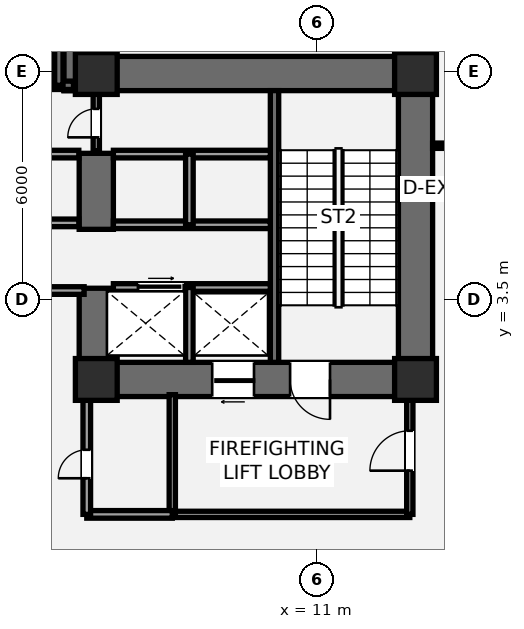
"""IFC4 building model, lengths in metres.
Left out: names, types, materials, properties, quantities, classifications, styles, units other than length and angle.
Written with IfcOpenShell. Run it as: python <this file> out.ifc"""

import sys

from ifc_helpers import new_model, si_unit, direction, frame, frame_2d, origin, origin_2d, place, context, subcontext, project, spatial, rectangle, extrude, element, fill, save


model = new_model("IFC4")
c1 = context("Model", 3, precision=1e-05, world=origin(), true_north=direction((0.0, 1.0)))
c2 = subcontext(c1, "Body", "Model", "MODEL_VIEW")
j1 = project(units=[si_unit("LENGTHUNIT", "METRE"), si_unit("PLANEANGLEUNIT", "RADIAN")], contexts=[c1])
p1 = place(None, origin())
s1 = spatial("IfcSite", under=j1, at=p1, CompositionType="ELEMENT")
p2 = place(p1, origin())
s2 = spatial("IfcBuilding", under=s1, at=p2, CompositionType="ELEMENT")
p3 = place(p2, frame((0.0, 0.0, -8.8)))
s3 = spatial("IfcBuildingStorey", under=s2, at=p3, CompositionType="ELEMENT", Elevation=-8.8)
p4 = place(p3, frame((13.6, 0.95, 0.0), z_axis=(0.0, 0.0, 1.0), x_axis=(0.0, 1.0, 0.0)))
e1 = element("IfcWall", 1, at=p4, inside=s3, PredefinedType="SHEAR", context=c2, shape_type="SweptSolid", body=[
    extrude(rectangle(XDim=8.95, YDim=0.9, at=frame_2d((4.475, 0.0))), origin(), (0.0, 0.0, 1.0), 4.4),
])
p5 = place(p3, frame((4.35, 9.45, 0.0), z_axis=(0.0, 0.0, 1.0), x_axis=(1.0, 0.0, 0.0)))
e2 = element("IfcWall", 2, at=p5, inside=s3, PredefinedType="SHEAR", context=c2, shape_type="SweptSolid", body=[
    extrude(rectangle(XDim=9.7, YDim=0.9, at=frame_2d((4.85, 0.0))), origin(), (0.0, 0.0, 1.0), 4.4),
])
p6 = place(p3, frame((14.05, 1.4, 0.0), z_axis=(0.0, 0.0, 1.0), x_axis=(-1.0, 0.0, 0.0)))
e3 = element("IfcWall", 3, at=p6, inside=s3, PredefinedType="SHEAR", context=c2, shape_type="SweptSolid", body=[
    extrude(rectangle(XDim=9.3, YDim=0.9, at=frame_2d((4.65, 0.0))), origin(), (0.0, 0.0, 1.0), 4.4),
])
p7 = place(p6, frame((2.7, 0.0, 0.0)))
e4 = element("IfcOpeningElement", 4, at=p7, cuts=e3, PredefinedType="OPENING", context=c2, shape_type="SweptSolid", body=[
    extrude(rectangle(XDim=1.05, YDim=2.15, at=frame_2d((0.525, 1.075))), frame((0.0, 0.46, 0.0), z_axis=(0.0, -1.0, 0.0), x_axis=(1.0, 0.0, 0.0)), (0.0, 0.0, 1.0), 0.92),
])
p8 = place(p6, frame((4.7, 0.0, 0.0)))
e5 = element("IfcOpeningElement", 5, at=p8, cuts=e3, PredefinedType="OPENING", context=c2, shape_type="SweptSolid", body=[
    extrude(rectangle(XDim=1.1, YDim=2.2, at=frame_2d((0.55, 1.1))), frame((0.0, 0.46, 0.0), z_axis=(0.0, -1.0, 0.0), x_axis=(1.0, 0.0, 0.0)), (0.0, 0.0, 1.0), 0.92),
])
p9 = place(p3, frame((5.2, 0.95, 0.0), z_axis=(0.0, 0.0, 1.0), x_axis=(0.0, 1.0, 0.0)))
e6 = element("IfcWall", 6, at=p9, inside=s3, PredefinedType="SHEAR", context=c2, shape_type="SweptSolid", body=[
    extrude(rectangle(XDim=2.85, YDim=0.9, at=frame_2d((1.425, 0.0))), origin(), (0.0, 0.0, 1.0), 4.4),
])
p10 = place(p3, frame((5.2, 5.35, 0.0), z_axis=(0.0, 0.0, 1.0), x_axis=(0.0, 1.0, 0.0)))
e7 = element("IfcWall", 7, at=p10, inside=s3, PredefinedType="SHEAR", context=c2, shape_type="SweptSolid", body=[
    extrude(rectangle(XDim=2.0, YDim=0.9, at=frame_2d((1.0, 0.0))), origin(), (0.0, 0.0, 1.0), 4.4),
])
p11 = place(p3, frame((9.89, 1.85, 0.0), z_axis=(0.0, 0.0, 1.0), x_axis=(0.0, 1.0, 0.0)))
e8 = element("IfcWall", 8, at=p11, inside=s3, PredefinedType="SHEAR", context=c2, shape_type="SweptSolid", body=[
    extrude(rectangle(XDim=7.15, YDim=0.22, at=frame_2d((3.575, 0.0))), origin(), (0.0, 0.0, 1.0), 4.4),
])
p12 = place(p3, frame((4.8, 9.0, 0.0), z_axis=(0.0, 0.0, 1.0), x_axis=(0.0, 1.0, 0.0)))
e9 = element("IfcWall", 9, at=p12, inside=s3, PredefinedType="SHEAR", context=c2, shape_type="SweptSolid", body=[
    extrude(rectangle(XDim=4.3, YDim=0.9, at=frame_2d((2.15, 0.0))), origin(), (0.0, 0.0, 1.0), 4.4),
])
p13 = place(p3, frame((-4.7, 9.14, 0.0), z_axis=(0.0, 0.0, 1.0), x_axis=(1.0, 0.0, 0.0)))
e10 = element("IfcWall", 10, at=p13, inside=s3, PredefinedType="SHEAR", context=c2, shape_type="SweptSolid", body=[
    extrude(rectangle(XDim=9.3, YDim=0.22, at=frame_2d((4.65, 0.0))), origin(), (0.0, 0.0, 1.0), 4.4),
])
p14 = place(p13, frame((1.15, 0.0, 0.0)))
e11 = element("IfcOpeningElement", 11, at=p14, cuts=e10, PredefinedType="OPENING", context=c2, shape_type="SweptSolid", body=[
    extrude(rectangle(XDim=1.05, YDim=2.15, at=frame_2d((0.525, 1.075))), frame((0.0, 0.12, 0.0), z_axis=(0.0, -1.0, 0.0), x_axis=(1.0, 0.0, 0.0)), (0.0, 0.0, 1.0), 0.24),
])
p15 = place(p3, frame((4.215, 9.14, 0.0), z_axis=(0.0, 0.0, 1.0), x_axis=(0.0, 1.0, 0.0)))
e12 = element("IfcWall", 12, at=p15, inside=s3, PredefinedType="SHEAR", context=c2, shape_type="SweptSolid", body=[
    extrude(rectangle(XDim=3.26, YDim=0.22, at=frame_2d((1.63, 0.0))), origin(), (0.0, 0.0, 1.0), 4.4),
])
for number, where, z_axis, x_axis in (
    (13, (5.2, 1.4, 0.0), (0.0, 0.0, 1.0), (1.0, 0.0, 0.0)),
    (14, (5.2, 9.45, 0.0), (0.0, 0.0, 1.0), (1.0, 0.0, 0.0)),
    (15, (13.6, 1.4, 0.0), (0.0, 0.0, 1.0), (1.0, 0.0, 0.0)),
    (16, (13.6, 9.45, 0.0), (0.0, 0.0, 1.0), (1.0, 0.0, 0.0)),
):
    element("IfcColumn", number, at=place(p3, frame(where, z_axis=z_axis, x_axis=x_axis)), inside=s3, PredefinedType="COLUMN", context=c2, shape_type="SweptSolid", body=[
        extrude(rectangle(XDim=1.1, YDim=1.1, at=origin_2d()), origin(), (0.0, 0.0, 1.0), 4.4),
    ])
p16 = place(p3, frame((7.2, -2.15, 0.0), z_axis=(0.0, 0.0, 1.0), x_axis=(1.0, 0.0, 0.0)))
e17 = element("IfcWall", 17, at=p16, inside=s3, PredefinedType="PARTITIONING", context=c2, shape_type="SweptSolid", body=[
    extrude(rectangle(XDim=6.25, YDim=0.165, at=frame_2d((3.125, 0.0))), origin(), (0.0, 0.0, 1.0), 4.14),
])
p17 = place(p3, frame((7.2, -2.15, 0.0), z_axis=(0.0, 0.0, 1.0), x_axis=(0.0, 1.0, 0.0)))
e18 = element("IfcWall", 18, at=p17, inside=s3, PredefinedType="PARTITIONING", context=c2, shape_type="SweptSolid", body=[
    extrude(rectangle(XDim=3.15, YDim=0.165, at=frame_2d((1.575, 0.0))), origin(), (0.0, 0.0, 1.0), 4.14),
])
p18 = place(p3, frame((13.45, -2.15, 0.0), z_axis=(0.0, 0.0, 1.0), x_axis=(0.0, 1.0, 0.0)))
e19 = element("IfcWall", 19, at=p18, inside=s3, PredefinedType="PARTITIONING", context=c2, shape_type="SweptSolid", body=[
    extrude(rectangle(XDim=3.15, YDim=0.165, at=frame_2d((1.575, 0.0))), origin(), (0.0, 0.0, 1.0), 4.14),
])
p19 = place(p18, frame((1.15, 0.0, 0.0)))
e20 = element("IfcOpeningElement", 20, at=p19, cuts=e19, PredefinedType="OPENING", context=c2, shape_type="SweptSolid", body=[
    extrude(rectangle(XDim=1.05, YDim=2.15, at=frame_2d((0.525, 1.075))), frame((0.0, 0.093, 0.0), z_axis=(0.0, -1.0, 0.0), x_axis=(1.0, 0.0, 0.0)), (0.0, 0.0, 1.0), 0.185),
])
p20 = place(p3, frame((4.95, -2.15, 0.0), z_axis=(0.0, 0.0, 1.0), x_axis=(1.0, 0.0, 0.0)))
e21 = element("IfcWall", 21, at=p20, inside=s3, PredefinedType="SOLIDWALL", context=c2, shape_type="SweptSolid", body=[
    extrude(rectangle(XDim=2.25, YDim=0.2, at=frame_2d((1.125, 0.0))), origin(), (0.0, 0.0, 1.0), 4.14),
])
p21 = place(p3, frame((4.95, -2.15, 0.0), z_axis=(0.0, 0.0, 1.0), x_axis=(0.0, 1.0, 0.0)))
e22 = element("IfcWall", 22, at=p21, inside=s3, PredefinedType="SOLIDWALL", context=c2, shape_type="SweptSolid", body=[
    extrude(rectangle(XDim=3.15, YDim=0.2, at=frame_2d((1.575, 0.0))), origin(), (0.0, 0.0, 1.0), 3.508),
])
p22 = place(p21, frame((0.95, 0.0, 0.0)))
e23 = element("IfcOpeningElement", 23, at=p22, cuts=e22, PredefinedType="OPENING", context=c2, shape_type="SweptSolid", body=[
    extrude(rectangle(XDim=0.75, YDim=2.1, at=frame_2d((0.375, 1.05))), frame((0.0, 0.11, 0.0), z_axis=(0.0, -1.0, 0.0), x_axis=(1.0, 0.0, 0.0)), (0.0, 0.0, 1.0), 0.22),
])
p23 = place(p3, frame((5.65, 3.82, 0.0), z_axis=(0.0, 0.0, 1.0), x_axis=(1.0, 0.0, 0.0)))
e24 = element("IfcWall", 24, at=p23, inside=s3, PredefinedType="SOLIDWALL", context=c2, shape_type="SweptSolid", body=[
    extrude(rectangle(XDim=4.13, YDim=0.2, at=frame_2d((2.065, 0.0))), origin(), (0.0, 0.0, 1.0), 4.14),
])
p24 = place(p23, frame((0.65, 0.0, 0.0)))
e25 = element("IfcOpeningElement", 25, at=p24, cuts=e24, PredefinedType="OPENING", context=c2, shape_type="SweptSolid", body=[
    extrude(rectangle(XDim=1.2, YDim=2.2, at=frame_2d((0.6, 1.1))), frame((0.0, 0.11, 0.0), z_axis=(0.0, -1.0, 0.0), x_axis=(1.0, 0.0, 0.0)), (0.0, 0.0, 1.0), 0.22),
])
p25 = place(p3, frame((7.65, 1.85, 0.0), z_axis=(0.0, 0.0, 1.0), x_axis=(0.0, 1.0, 0.0)))
e26 = element("IfcWall", 26, at=p25, inside=s3, PredefinedType="SOLIDWALL", context=c2, shape_type="SweptSolid", body=[
    extrude(rectangle(XDim=1.97, YDim=0.2, at=frame_2d((0.985, 0.0))), origin(), (0.0, 0.0, 1.0), 4.14),
])
for number, where, z_axis, x_axis in (
    (27, (5.65, 5.47, 0.0), (0.0, 0.0, 1.0), (1.0, 0.0, 0.0)),
    (28, (5.65, 7.33, 0.0), (0.0, 0.0, 1.0), (1.0, 0.0, 0.0)),
):
    element("IfcWall", number, at=place(p3, frame(where, z_axis=z_axis, x_axis=x_axis)), inside=s3, PredefinedType="SOLIDWALL", context=c2, shape_type="SweptSolid", body=[
        extrude(rectangle(XDim=4.13, YDim=0.2, at=frame_2d((2.065, 0.0))), origin(), (0.0, 0.0, 1.0), 4.14),
    ])
p26 = place(p3, frame((7.65, 5.47, 0.0), z_axis=(0.0, 0.0, 1.0), x_axis=(0.0, 1.0, 0.0)))
e29 = element("IfcWall", 29, at=p26, inside=s3, PredefinedType="SOLIDWALL", context=c2, shape_type="SweptSolid", body=[
    extrude(rectangle(XDim=1.86, YDim=0.2, at=frame_2d((0.93, 0.0))), origin(), (0.0, 0.0, 1.0), 4.14),
])
p27 = place(p3, frame((0.88, 3.74, 0.0), z_axis=(0.0, 0.0, 1.0), x_axis=(1.0, 0.0, 0.0)))
e30 = element("IfcWall", 30, at=p27, inside=s3, PredefinedType="SOLIDWALL", context=c2, shape_type="SweptSolid", body=[
    extrude(rectangle(XDim=4.0, YDim=0.2, at=frame_2d((2.0, 0.0))), origin(), (0.0, 0.0, 1.0), 4.14),
])
p28 = place(p27, frame((1.2, 0.0, 0.0)))
e31 = element("IfcOpeningElement", 31, at=p28, cuts=e30, PredefinedType="OPENING", context=c2, shape_type="SweptSolid", body=[
    extrude(rectangle(XDim=0.85, YDim=2.1, at=frame_2d((0.425, 1.05))), frame((0.0, 0.11, 0.0), z_axis=(0.0, -1.0, 0.0), x_axis=(1.0, 0.0, 0.0)), (0.0, 0.0, 1.0), 0.22),
])
p29 = place(p3, frame((0.88, 5.52, 0.0), z_axis=(0.0, 0.0, 1.0), x_axis=(1.0, 0.0, 0.0)))
e32 = element("IfcWall", 32, at=p29, inside=s3, PredefinedType="SOLIDWALL", context=c2, shape_type="SweptSolid", body=[
    extrude(rectangle(XDim=3.86, YDim=0.2, at=frame_2d((1.93, 0.0))), origin(), (0.0, 0.0, 1.0), 4.14),
])
p30 = place(p29, frame((1.4, 0.0, 0.0)))
e33 = element("IfcOpeningElement", 33, at=p30, cuts=e32, PredefinedType="OPENING", context=c2, shape_type="SweptSolid", body=[
    extrude(rectangle(XDim=0.85, YDim=2.1, at=frame_2d((0.425, 1.05))), frame((0.0, 0.11, 0.0), z_axis=(0.0, -1.0, 0.0), x_axis=(1.0, 0.0, 0.0)), (0.0, 0.0, 1.0), 0.22),
])
p31 = place(p3, frame((0.88, 7.33, 0.0), z_axis=(0.0, 0.0, 1.0), x_axis=(1.0, 0.0, 0.0)))
e34 = element("IfcWall", 34, at=p31, inside=s3, PredefinedType="SOLIDWALL", context=c2, shape_type="SweptSolid", body=[
    extrude(rectangle(XDim=3.86, YDim=0.2, at=frame_2d((1.93, 0.0))), origin(), (0.0, 0.0, 1.0), 4.14),
])
p32 = place(p3, frame((5.2, 7.42, 0.0), z_axis=(0.0, 0.0, 1.0), x_axis=(0.0, 1.0, 0.0)))
e35 = element("IfcWall", 35, at=p32, inside=s3, PredefinedType="PARTITIONING", context=c2, shape_type="SweptSolid", body=[
    extrude(rectangle(XDim=1.58, YDim=0.165, at=frame_2d((0.79, 0.0))), origin(), (0.0, 0.0, 1.0), 4.14),
])
p33 = place(p32, frame((0.35, 0.0, 0.0)))
e36 = element("IfcOpeningElement", 36, at=p33, cuts=e35, PredefinedType="OPENING", context=c2, shape_type="SweptSolid", body=[
    extrude(rectangle(XDim=0.75, YDim=2.1, at=frame_2d((0.375, 1.05))), frame((0.0, 0.093, 0.0), z_axis=(0.0, -1.0, 0.0), x_axis=(1.0, 0.0, 0.0)), (0.0, 0.0, 1.0), 0.185),
])
p34 = place(p3, frame((14.05, 7.55, 0.0), z_axis=(0.0, 0.0, 1.0), x_axis=(1.0, 0.0, 0.0)))
e37 = element("IfcWall", 37, at=p34, inside=s3, PredefinedType="PARTITIONING", context=c2, shape_type="SweptSolid", body=[
    extrude(rectangle(XDim=3.15, YDim=0.14, at=frame_2d((1.575, 0.0))), origin(), (0.0, 0.0, 1.0), 4.14),
])
p35 = place(p34, frame((0.32, 0.0, 0.0)))
e38 = element("IfcOpeningElement", 38, at=p35, cuts=e37, PredefinedType="OPENING", context=c2, shape_type="SweptSolid", body=[
    extrude(rectangle(XDim=0.92, YDim=2.15, at=frame_2d((0.46, 1.075))), frame((0.0, 0.08, 0.0), z_axis=(0.0, -1.0, 0.0), x_axis=(1.0, 0.0, 0.0)), (0.0, 0.0, 1.0), 0.16),
])
p36 = place(p7, origin())
e39 = element("IfcDoor", 39, at=p36, inside=s3, OperationType="SINGLE_SWING_LEFT", PredefinedType="DOOR", context=c2, shape_type="SweptSolid", body=[
    extrude(rectangle(XDim=1.05, YDim=2.15, at=frame_2d((0.525, 1.075))), frame((0.0, 0.025, 0.0), z_axis=(0.0, -1.0, 0.0), x_axis=(1.0, 0.0, 0.0)), (0.0, 0.0, 1.0), 0.05),
])
fill(e4, e39)
p37 = place(p19, origin())
e40 = element("IfcDoor", 40, at=p37, inside=s3, OperationType="SINGLE_SWING_LEFT", PredefinedType="DOOR", context=c2, shape_type="SweptSolid", body=[
    extrude(rectangle(XDim=1.05, YDim=2.15, at=frame_2d((0.525, 1.075))), frame((0.0, 0.025, 0.0), z_axis=(0.0, -1.0, 0.0), x_axis=(1.0, 0.0, 0.0)), (0.0, 0.0, 1.0), 0.05),
])
fill(e20, e40)
p38 = place(p22, origin())
e41 = element("IfcDoor", 41, at=p38, inside=s3, OperationType="SINGLE_SWING_LEFT", PredefinedType="DOOR", context=c2, shape_type="SweptSolid", body=[
    extrude(rectangle(XDim=0.75, YDim=2.1, at=frame_2d((0.375, 1.05))), frame((0.0, 0.025, 0.0), z_axis=(0.0, -1.0, 0.0), x_axis=(1.0, 0.0, 0.0)), (0.0, 0.0, 1.0), 0.05),
])
fill(e23, e41)
p39 = place(p8, origin())
e42 = element("IfcDoor", 42, at=p39, inside=s3, OperationType="SLIDING_TO_LEFT", PredefinedType="DOOR", context=c2, shape_type="SweptSolid", body=[
    extrude(rectangle(XDim=1.1, YDim=2.2, at=frame_2d((0.55, 1.1))), frame((0.0, 0.025, 0.0), z_axis=(0.0, -1.0, 0.0), x_axis=(1.0, 0.0, 0.0)), (0.0, 0.0, 1.0), 0.05),
])
fill(e5, e42)
p40 = place(p24, origin())
e43 = element("IfcDoor", 43, at=p40, inside=s3, OperationType="SLIDING_TO_RIGHT", PredefinedType="DOOR", context=c2, shape_type="SweptSolid", body=[
    extrude(rectangle(XDim=1.2, YDim=2.2, at=frame_2d((0.6, 1.1))), frame((0.0, 0.025, 0.0), z_axis=(0.0, -1.0, 0.0), x_axis=(1.0, 0.0, 0.0)), (0.0, 0.0, 1.0), 0.05),
])
fill(e25, e43)
p41 = place(p33, origin())
e44 = element("IfcDoor", 44, at=p41, inside=s3, OperationType="SINGLE_SWING_LEFT", PredefinedType="DOOR", context=c2, shape_type="SweptSolid", body=[
    extrude(rectangle(XDim=0.75, YDim=2.1, at=frame_2d((0.375, 1.05))), frame((0.0, 0.025, 0.0), z_axis=(0.0, -1.0, 0.0), x_axis=(1.0, 0.0, 0.0)), (0.0, 0.0, 1.0), 0.05),
])
fill(e36, e44)
save(model, sys.argv[1])
